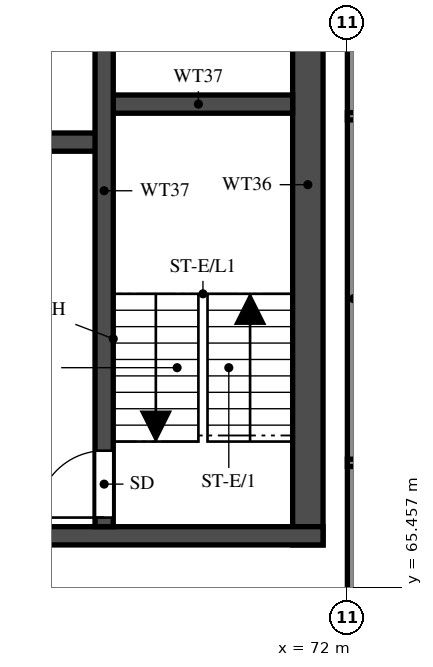
"""IFC4 building model, lengths in metres.
Left out: names, types, materials, properties, quantities, classifications, styles, units other than length and angle.
Written with IfcOpenShell. Run it as: python <this file> out.ifc"""

import sys

from ifc_helpers import new_model, si_unit, direction, frame, frame_2d, origin, place, context, subcontext, project, spatial, rectangle, extrude, element, fill, save


model = new_model("IFC4")
c1 = context("Model", 3, precision=1e-05, world=origin(), true_north=direction((0.0, 1.0)))
c2 = subcontext(c1, "Body", "Model", "MODEL_VIEW")
j1 = project(units=[si_unit("LENGTHUNIT", "METRE"), si_unit("PLANEANGLEUNIT", "RADIAN")], contexts=[c1])
p1 = place(None, origin())
s1 = spatial("IfcSite", under=j1, at=p1, CompositionType="ELEMENT")
p2 = place(p1, origin())
s2 = spatial("IfcBuilding", under=s1, at=p2, CompositionType="ELEMENT")
p3 = place(p2, frame((0.0, 0.0, 253.5)))
s3 = spatial("IfcBuildingStorey", under=s2, at=p3, CompositionType="ELEMENT", Elevation=253.5)
p4 = place(p3, frame((71.35, 66.15, 0.0), z_axis=(0.0, 0.0, 1.0), x_axis=(0.0, 1.0, 0.0)))
e1 = element("IfcWall", 1, at=p4, inside=s3, PredefinedType="SHEAR", context=c2, shape_type="SweptSolid", body=[
    extrude(rectangle(XDim=11.85, YDim=0.5, at=frame_2d((5.925, 0.0))), origin(), (0.0, 0.0, 1.0), 3.22),
])
p5 = place(p3, frame((29.2, 66.3, 0.0), z_axis=(0.0, 0.0, 1.0), x_axis=(1.0, 0.0, 0.0)))
e2 = element("IfcWall", 2, at=p5, inside=s3, PredefinedType="SHEAR", context=c2, shape_type="SweptSolid", body=[
    extrude(rectangle(XDim=42.4, YDim=0.3, at=frame_2d((21.2, 0.0))), origin(), (0.0, 0.0, 1.0), 3.22),
])
p6 = place(p5, frame((1.425, 0.0, 0.0)))
e3 = element("IfcOpeningElement", 3, at=p6, cuts=e2, PredefinedType="OPENING", context=c2, shape_type="SweptSolid", body=[
    extrude(rectangle(XDim=1.1, YDim=2.1, at=frame_2d((0.55, 1.05))), frame((0.0, 0.16, 0.0), z_axis=(0.0, -1.0, 0.0), x_axis=(1.0, 0.0, 0.0)), (0.0, 0.0, 1.0), 0.32),
])
p7 = place(p5, frame((4.2, 0.0, 0.0)))
e4 = element("IfcOpeningElement", 4, at=p7, cuts=e2, PredefinedType="OPENING", context=c2, shape_type="SweptSolid", body=[
    extrude(rectangle(XDim=1.8, YDim=2.1, at=frame_2d((0.9, 1.05))), frame((0.0, 0.16, 0.0), z_axis=(0.0, -1.0, 0.0), x_axis=(1.0, 0.0, 0.0)), (0.0, 0.0, 1.0), 0.32),
])
p8 = place(p3, frame((32.8, 72.775, 0.0), z_axis=(0.0, 0.0, 1.0), x_axis=(1.0, 0.0, 0.0)))
e5 = element("IfcWall", 5, at=p8, inside=s3, PredefinedType="SHEAR", context=c2, shape_type="SweptSolid", body=[
    extrude(rectangle(XDim=35.2, YDim=0.3, at=frame_2d((17.6, 0.0))), origin(), (0.0, 0.0, 1.0), 3.22),
])
p9 = place(p8, frame((19.8, 0.0, 0.0)))
e6 = element("IfcOpeningElement", 6, at=p9, cuts=e5, PredefinedType="OPENING", context=c2, shape_type="SweptSolid", body=[
    extrude(rectangle(XDim=1.1, YDim=2.1, at=frame_2d((0.55, 1.05))), frame((0.0, 0.16, 0.0), z_axis=(0.0, -1.0, 0.0), x_axis=(1.0, 0.0, 0.0)), (0.0, 0.0, 1.0), 0.32),
])
p10 = place(p8, frame((27.725, 0.0, 0.0)))
e7 = element("IfcOpeningElement", 7, at=p10, cuts=e5, PredefinedType="OPENING", context=c2, shape_type="SweptSolid", body=[
    extrude(rectangle(XDim=1.1, YDim=2.1, at=frame_2d((0.55, 1.05))), frame((0.0, 0.16, 0.0), z_axis=(0.0, -1.0, 0.0), x_axis=(1.0, 0.0, 0.0)), (0.0, 0.0, 1.0), 0.32),
])
p11 = place(p8, frame((30.325, 0.0, 0.0)))
e8 = element("IfcOpeningElement", 8, at=p11, cuts=e5, PredefinedType="OPENING", context=c2, shape_type="SweptSolid", body=[
    extrude(rectangle(XDim=1.1, YDim=2.1, at=frame_2d((0.55, 1.05))), frame((0.0, 0.16, 0.0), z_axis=(0.0, -1.0, 0.0), x_axis=(1.0, 0.0, 0.0)), (0.0, 0.0, 1.0), 0.32),
])
p12 = place(p8, frame((3.825, 0.0, 0.0)))
e9 = element("IfcOpeningElement", 9, at=p12, cuts=e5, PredefinedType="OPENING", context=c2, shape_type="SweptSolid", body=[
    extrude(rectangle(XDim=1.1, YDim=2.1, at=frame_2d((0.55, 1.05))), frame((0.0, 0.16, 0.0), z_axis=(0.0, -1.0, 0.0), x_axis=(1.0, 0.0, 0.0)), (0.0, 0.0, 1.0), 0.32),
])
p13 = place(p8, frame((6.575, 0.0, 0.0)))
e10 = element("IfcOpeningElement", 10, at=p13, cuts=e5, PredefinedType="OPENING", context=c2, shape_type="SweptSolid", body=[
    extrude(rectangle(XDim=1.1, YDim=2.1, at=frame_2d((0.55, 1.05))), frame((0.0, 0.16, 0.0), z_axis=(0.0, -1.0, 0.0), x_axis=(1.0, 0.0, 0.0)), (0.0, 0.0, 1.0), 0.32),
])
p14 = place(p8, frame((9.325, 0.0, 0.0)))
e11 = element("IfcOpeningElement", 11, at=p14, cuts=e5, PredefinedType="OPENING", context=c2, shape_type="SweptSolid", body=[
    extrude(rectangle(XDim=1.1, YDim=2.1, at=frame_2d((0.55, 1.05))), frame((0.0, 0.16, 0.0), z_axis=(0.0, -1.0, 0.0), x_axis=(1.0, 0.0, 0.0)), (0.0, 0.0, 1.0), 0.32),
])
p15 = place(p8, frame((12.075, 0.0, 0.0)))
e12 = element("IfcOpeningElement", 12, at=p15, cuts=e5, PredefinedType="OPENING", context=c2, shape_type="SweptSolid", body=[
    extrude(rectangle(XDim=1.1, YDim=2.1, at=frame_2d((0.55, 1.05))), frame((0.0, 0.16, 0.0), z_axis=(0.0, -1.0, 0.0), x_axis=(1.0, 0.0, 0.0)), (0.0, 0.0, 1.0), 0.32),
])
p16 = place(p8, frame((14.825, 0.0, 0.0)))
e13 = element("IfcOpeningElement", 13, at=p16, cuts=e5, PredefinedType="OPENING", context=c2, shape_type="SweptSolid", body=[
    extrude(rectangle(XDim=1.1, YDim=2.1, at=frame_2d((0.55, 1.05))), frame((0.0, 0.16, 0.0), z_axis=(0.0, -1.0, 0.0), x_axis=(1.0, 0.0, 0.0)), (0.0, 0.0, 1.0), 0.32),
])
p17 = place(p8, frame((17.575, 0.0, 0.0)))
e14 = element("IfcOpeningElement", 14, at=p17, cuts=e5, PredefinedType="OPENING", context=c2, shape_type="SweptSolid", body=[
    extrude(rectangle(XDim=1.1, YDim=2.1, at=frame_2d((0.55, 1.05))), frame((0.0, 0.16, 0.0), z_axis=(0.0, -1.0, 0.0), x_axis=(1.0, 0.0, 0.0)), (0.0, 0.0, 1.0), 0.32),
])
p18 = place(p8, frame((0.95, 0.0, 0.0)))
e15 = element("IfcOpeningElement", 15, at=p18, cuts=e5, PredefinedType="OPENING", context=c2, shape_type="SweptSolid", body=[
    extrude(rectangle(XDim=1.1, YDim=2.1, at=frame_2d((0.55, 1.05))), frame((0.0, 0.16, 0.0), z_axis=(0.0, -1.0, 0.0), x_axis=(1.0, 0.0, 0.0)), (0.0, 0.0, 1.0), 0.32),
])
p19 = place(p3, frame((68.0, 73.4, 0.0), z_axis=(0.0, 0.0, 1.0), x_axis=(1.0, 0.0, 0.0)))
e16 = element("IfcWall", 16, at=p19, inside=s3, PredefinedType="SHEAR", context=c2, shape_type="SweptSolid", body=[
    extrude(rectangle(XDim=3.1, YDim=0.3, at=frame_2d((1.55, 0.0))), origin(), (0.0, 0.0, 1.0), 3.22),
])
p20 = place(p3, frame((68.0, 66.45, 0.0), z_axis=(0.0, 0.0, 1.0), x_axis=(0.0, 1.0, 0.0)))
e17 = element("IfcWall", 17, at=p20, inside=s3, PredefinedType="SHEAR", context=c2, shape_type="SweptSolid", body=[
    extrude(rectangle(XDim=11.05, YDim=0.3, at=frame_2d((5.525, 0.0))), origin(), (0.0, 0.0, 1.0), 3.22),
])
p21 = place(p20, frame((0.15, 0.0, 0.0)))
e18 = element("IfcOpeningElement", 18, at=p21, cuts=e17, PredefinedType="OPENING", context=c2, shape_type="SweptSolid", body=[
    extrude(rectangle(XDim=1.1, YDim=2.1, at=frame_2d((0.55, 1.05))), frame((0.0, 0.16, 0.0), z_axis=(0.0, -1.0, 0.0), x_axis=(1.0, 0.0, 0.0)), (0.0, 0.0, 1.0), 0.32),
])
p22 = place(p3, frame((72.1, 62.4, 0.0), z_axis=(0.0, 0.0, 1.0), x_axis=(0.0, 1.0, 0.0)))
e19 = element("IfcWall", 19, at=p22, inside=s3, PredefinedType="SOLIDWALL", context=c2, shape_type="SweptSolid", body=[
    extrude(rectangle(XDim=15.6, YDim=0.2, at=frame_2d((7.8, 0.0))), origin(), (0.0, 0.0, 1.0), 3.22),
])
p23 = place(p3, frame((72.0, 67.5, 0.0), z_axis=(0.0, 0.0, 1.0), x_axis=(1.0, 0.0, 0.0)))
e20 = element("IfcWall", 20, at=p23, inside=s3, PredefinedType="PARTITIONING", context=c2, shape_type="SweptSolid", body=[
    extrude(rectangle(XDim=3.5, YDim=0.12, at=frame_2d((1.75, 0.0))), origin(), (0.0, 0.0, 1.0), 3.22),
])
p24 = place(p3, frame((72.0, 73.2, 0.0), z_axis=(0.0, 0.0, 1.0), x_axis=(1.0, 0.0, 0.0)))
e21 = element("IfcWall", 21, at=p24, inside=s3, PredefinedType="PARTITIONING", context=c2, shape_type="SweptSolid", body=[
    extrude(rectangle(XDim=10.275, YDim=0.12, at=frame_2d((5.137, 0.0))), origin(), (0.0, 0.0, 1.0), 2.32),
])
p25 = place(p24, frame((4.1, 0.0, 0.0)))
e22 = element("IfcOpeningElement", 22, at=p25, cuts=e21, PredefinedType="OPENING", context=c2, shape_type="SweptSolid", body=[
    extrude(rectangle(XDim=0.9, YDim=2.1, at=frame_2d((0.45, 1.05))), frame((0.0, 0.07, 0.0), z_axis=(0.0, -1.0, 0.0), x_axis=(1.0, 0.0, 0.0)), (0.0, 0.0, 1.0), 0.14),
])
p26 = place(p21, origin())
e23 = element("IfcDoor", 23, at=p26, inside=s3, OperationType="SINGLE_SWING_RIGHT", PredefinedType="DOOR", context=c2, shape_type="SweptSolid", body=[
    extrude(rectangle(XDim=1.1, YDim=2.1, at=frame_2d((0.55, 1.05))), frame((0.0, 0.025, 0.0), z_axis=(0.0, -1.0, 0.0), x_axis=(1.0, 0.0, 0.0)), (0.0, 0.0, 1.0), 0.05),
])
fill(e18, e23)
save(model, sys.argv[1])
